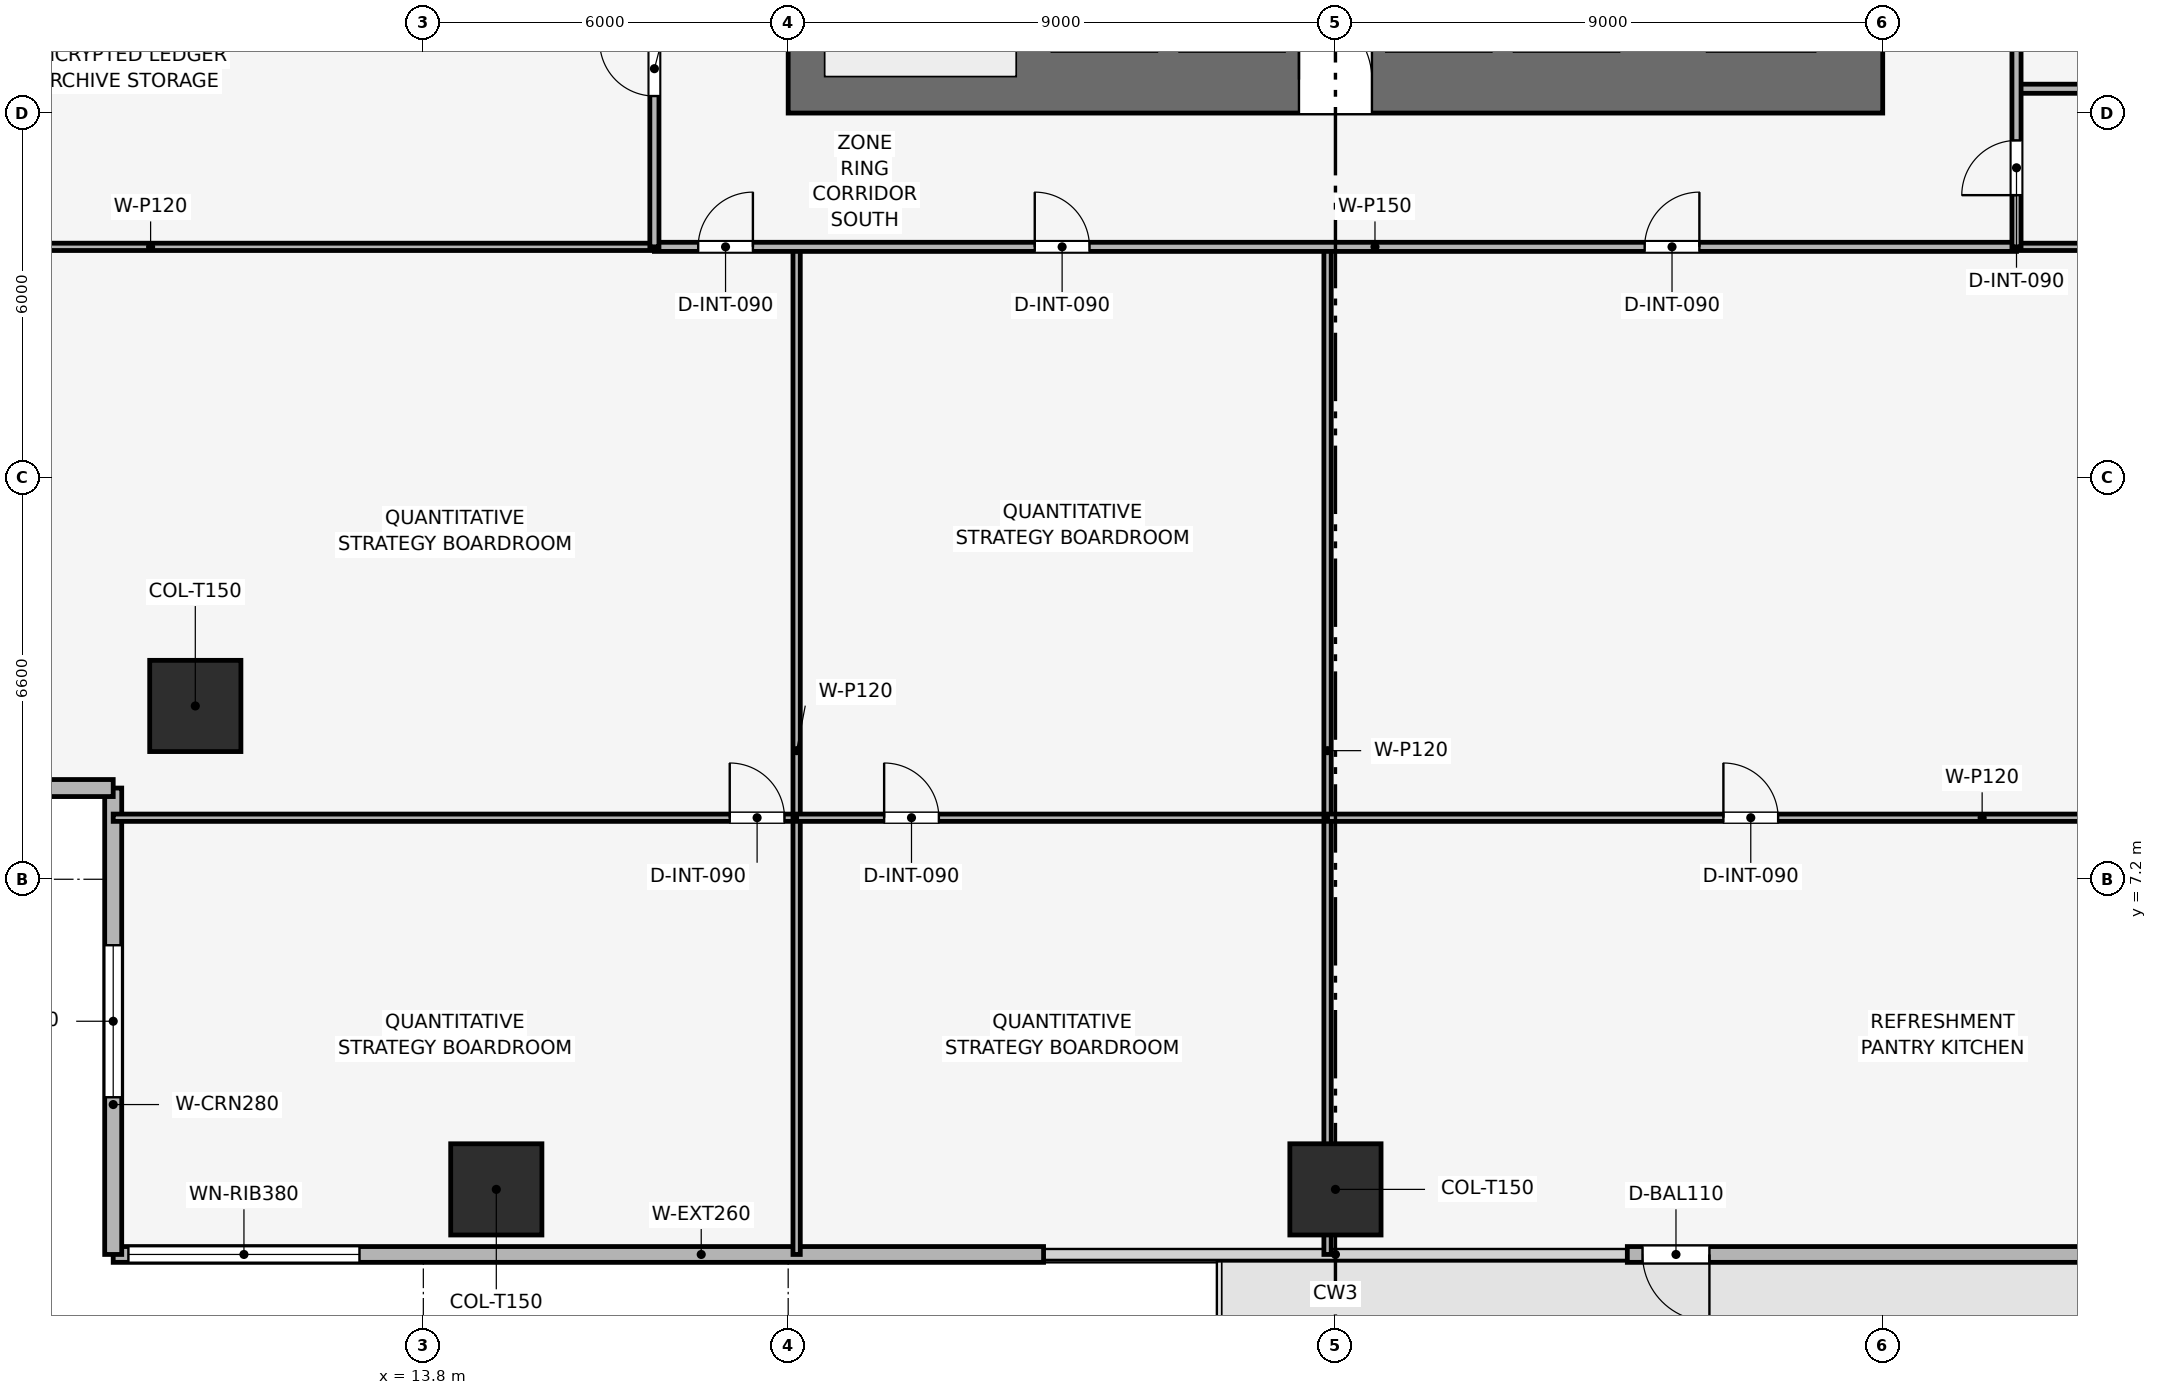
"""IFC4 building model, lengths in metres.
Left out: names, types, materials, properties, quantities, classifications, styles, units other than length and angle.
Written with IfcOpenShell. Run it as: python <this file> out.ifc"""

import sys

from ifc_helpers import new_model, si_unit, direction, frame, frame_2d, origin, origin_2d, place, context, subcontext, project, spatial, rectangle, extrude, element, fill, save


model = new_model("IFC4")
c1 = context("Model", 3, precision=1e-05, world=origin(), true_north=direction((0.0, 1.0)))
c2 = subcontext(c1, "Body", "Model", "MODEL_VIEW")
j1 = project(units=[si_unit("LENGTHUNIT", "METRE"), si_unit("PLANEANGLEUNIT", "RADIAN")], contexts=[c1])
p1 = place(None, origin())
s1 = spatial("IfcSite", under=j1, at=p1, CompositionType="ELEMENT")
p2 = place(p1, origin())
s2 = spatial("IfcBuilding", under=s1, at=p2, CompositionType="ELEMENT")
p3 = place(p2, frame((0.0, 0.0, 33.9)))
s3 = spatial("IfcBuildingStorey", under=s2, at=p3, CompositionType="ELEMENT", Elevation=33.9)
p4 = place(p3, frame((19.8, 20.35, 0.0), z_axis=(0.0, 0.0, 1.0), x_axis=(1.0, 0.0, 0.0)))
e1 = element("IfcWall", 1, at=p4, inside=s3, PredefinedType="SHEAR", context=c2, shape_type="SweptSolid", body=[
    extrude(rectangle(XDim=18.0, YDim=1.1, at=frame_2d((9.0, 0.0))), origin(), (0.0, 0.0, 1.0), 3.9),
])
p5 = place(p4, frame((8.4, 0.0, 0.0)))
e2 = element("IfcOpeningElement", 2, at=p5, cuts=e1, PredefinedType="OPENING", context=c2, shape_type="SweptSolid", body=[
    extrude(rectangle(XDim=1.2, YDim=2.2, at=frame_2d((0.6, 1.1))), frame((0.0, 0.56, 0.0), z_axis=(0.0, -1.0, 0.0), x_axis=(1.0, 0.0, 0.0)), (0.0, 0.0, 1.0), 1.12),
])
for number, where, z_axis, x_axis in (
    (3, (15.0, 2.1, 0.003), (0.0, 0.0, 1.0), (1.0, 0.0, 0.0)),
    (4, (28.8, 2.1, 0.003), (0.0, 0.0, 1.0), (1.0, 0.0, 0.0)),
    (5, (10.05, 10.05, 0.003), (0.0, 0.0, 1.0), (1.0, 0.0, 0.0)),
):
    element("IfcColumn", number, at=place(p3, frame(where, z_axis=z_axis, x_axis=x_axis)), inside=s3, PredefinedType="COLUMN", context=c2, shape_type="SweptSolid", body=[
        extrude(rectangle(XDim=1.5, YDim=1.5, at=origin_2d()), origin(), (0.0, 0.0, 1.0), 3.644),
    ])
p6 = place(p3, frame((48.9, 1.03, 0.0), z_axis=(0.0, 0.0, 1.0), x_axis=(-1.0, 0.0, 0.0)))
e6 = element("IfcWall", 6, at=p6, inside=s3, PredefinedType="SOLIDWALL", context=c2, shape_type="SweptSolid", body=[
    extrude(rectangle(XDim=15.3, YDim=0.26, at=frame_2d((7.65, 0.0))), origin(), (0.0, 0.0, 1.0), 3.65),
])
p7 = place(p6, frame((13.95, 0.0, 0.0)))
e7 = element("IfcOpeningElement", 7, at=p7, cuts=e6, PredefinedType="OPENING", context=c2, shape_type="SweptSolid", body=[
    extrude(rectangle(XDim=1.1, YDim=2.2, at=frame_2d((0.55, 1.1))), frame((0.0, 0.14, 0.0), z_axis=(0.0, -1.0, 0.0), x_axis=(1.0, 0.0, 0.0)), (0.0, 0.0, 1.0), 0.28),
])
p8 = place(p3, frame((24.0, 1.03, 0.0), z_axis=(0.0, 0.0, 1.0), x_axis=(-1.0, 0.0, 0.0)))
e8 = element("IfcWall", 8, at=p8, inside=s3, PredefinedType="SOLIDWALL", context=c2, shape_type="SweptSolid", body=[
    extrude(rectangle(XDim=15.3, YDim=0.26, at=frame_2d((7.65, 0.0))), origin(), (0.0, 0.0, 1.0), 3.65),
])
p9 = place(p8, frame((11.25, 0.0, 0.9)))
e9 = element("IfcOpeningElement", 9, at=p9, cuts=e8, PredefinedType="OPENING", context=c2, shape_type="SweptSolid", body=[
    extrude(rectangle(XDim=3.8, YDim=1.9, at=frame_2d((1.9, 0.95))), frame((0.0, 0.14, 0.0), z_axis=(0.0, -1.0, 0.0), x_axis=(1.0, 0.0, 0.0)), (0.0, 0.0, 1.0), 0.28),
])
p10 = place(p3, frame((8.7, 1.03, 0.0), z_axis=(0.0, 0.0, 1.0), x_axis=(0.0, 1.0, 0.0)))
e10 = element("IfcWall", 10, at=p10, inside=s3, PredefinedType="SOLIDWALL", context=c2, shape_type="SweptSolid", body=[
    extrude(rectangle(XDim=7.67, YDim=0.28, at=frame_2d((3.835, 0.0))), origin(), (0.0, 0.0, 1.0), 3.65),
])
p11 = place(p10, frame((2.585, 0.0, 0.9)))
e11 = element("IfcOpeningElement", 11, at=p11, cuts=e10, PredefinedType="OPENING", context=c2, shape_type="SweptSolid", body=[
    extrude(rectangle(XDim=2.5, YDim=1.9, at=frame_2d((1.25, 0.95))), frame((0.0, 0.15, 0.0), z_axis=(0.0, -1.0, 0.0), x_axis=(1.0, 0.0, 0.0)), (0.0, 0.0, 1.0), 0.3),
])
p12 = place(p3, frame((8.7, 8.7, 0.0), z_axis=(0.0, 0.0, 1.0), x_axis=(-1.0, 0.0, 0.0)))
e12 = element("IfcWall", 12, at=p12, inside=s3, PredefinedType="SOLIDWALL", context=c2, shape_type="SweptSolid", body=[
    extrude(rectangle(XDim=7.67, YDim=0.28, at=frame_2d((3.835, 0.0))), origin(), (0.0, 0.0, 1.0), 3.65),
])
p13 = place(p12, frame((2.585, 0.0, 0.9)))
e13 = element("IfcOpeningElement", 13, at=p13, cuts=e12, PredefinedType="OPENING", context=c2, shape_type="SweptSolid", body=[
    extrude(rectangle(XDim=2.5, YDim=1.9, at=frame_2d((1.25, 0.95))), frame((0.0, 0.15, 0.0), z_axis=(0.0, -1.0, 0.0), x_axis=(1.0, 0.0, 0.0)), (0.0, 0.0, 1.0), 0.3),
])
p14 = place(p3, frame((8.7, 8.212, 0.0), z_axis=(0.0, 0.0, 1.0), x_axis=(1.0, 0.0, 0.0)))
e14 = element("IfcWall", 14, at=p14, inside=s3, PredefinedType="PARTITIONING", context=c2, shape_type="SweptSolid", body=[
    extrude(rectangle(XDim=11.239, YDim=0.12, at=frame_2d((5.62, 0.0))), origin(), (0.0, 0.0, 1.0), 2.935),
])
p15 = place(p14, frame((10.139, 0.0, 0.0)))
e15 = element("IfcOpeningElement", 15, at=p15, cuts=e14, PredefinedType="OPENING", context=c2, shape_type="SweptSolid", body=[
    extrude(rectangle(XDim=0.9, YDim=2.1, at=frame_2d((0.45, 1.05))), frame((0.0, 0.07, 0.0), z_axis=(0.0, -1.0, 0.0), x_axis=(1.0, 0.0, 0.0)), (0.0, 0.0, 1.0), 0.14),
])
p16 = place(p3, frame((19.939, 1.03, 0.0), z_axis=(0.0, 0.0, 1.0), x_axis=(0.0, 1.0, 0.0)))
e16 = element("IfcWall", 16, at=p16, inside=s3, PredefinedType="PARTITIONING", context=c2, shape_type="SweptSolid", body=[
    extrude(rectangle(XDim=16.57, YDim=0.12, at=frame_2d((8.285, 0.0))), origin(), (0.0, 0.0, 1.0), 2.935),
])
p17 = place(p3, frame((19.939, 8.212, 0.0), z_axis=(0.0, 0.0, 1.0), x_axis=(1.0, 0.0, 0.0)))
e17 = element("IfcWall", 17, at=p17, inside=s3, PredefinedType="PARTITIONING", context=c2, shape_type="SweptSolid", body=[
    extrude(rectangle(XDim=8.731, YDim=0.12, at=frame_2d((4.365, 0.0))), origin(), (0.0, 0.0, 1.0), 3.085),
])
p18 = place(p17, frame((1.439, 0.0, 0.0)))
e18 = element("IfcOpeningElement", 18, at=p18, cuts=e17, PredefinedType="OPENING", context=c2, shape_type="SweptSolid", body=[
    extrude(rectangle(XDim=0.9, YDim=2.1, at=frame_2d((0.45, 1.05))), frame((0.0, 0.07, 0.0), z_axis=(0.0, -1.0, 0.0), x_axis=(1.0, 0.0, 0.0)), (0.0, 0.0, 1.0), 0.14),
])
p19 = place(p3, frame((28.67, 1.03, 0.0), z_axis=(0.0, 0.0, 1.0), x_axis=(0.0, 1.0, 0.0)))
e19 = element("IfcWall", 19, at=p19, inside=s3, PredefinedType="PARTITIONING", context=c2, shape_type="SweptSolid", body=[
    extrude(rectangle(XDim=16.57, YDim=0.12, at=frame_2d((8.285, 0.0))), origin(), (0.0, 0.0, 1.0), 3.085),
])
p20 = place(p3, frame((28.67, 8.212, 0.0), z_axis=(0.0, 0.0, 1.0), x_axis=(1.0, 0.0, 0.0)))
e20 = element("IfcWall", 20, at=p20, inside=s3, PredefinedType="PARTITIONING", context=c2, shape_type="SweptSolid", body=[
    extrude(rectangle(XDim=20.23, YDim=0.12, at=frame_2d((10.115, 0.0))), origin(), (0.0, 0.0, 1.0), 2.935),
])
p21 = place(p20, frame((6.51, 0.0, 0.0)))
e21 = element("IfcOpeningElement", 21, at=p21, cuts=e20, PredefinedType="OPENING", context=c2, shape_type="SweptSolid", body=[
    extrude(rectangle(XDim=0.9, YDim=2.1, at=frame_2d((0.45, 1.05))), frame((0.0, 0.07, 0.0), z_axis=(0.0, -1.0, 0.0), x_axis=(1.0, 0.0, 0.0)), (0.0, 0.0, 1.0), 0.14),
])
for number, where, z_axis, x_axis in (
    (22, (1.03, 17.6, 0.0), (0.0, 0.0, 1.0), (1.0, 0.0, 0.0)),
    (23, (40.0, 17.6, 0.0), (0.0, 0.0, 1.0), (1.0, 0.0, 0.0)),
):
    element("IfcWall", number, at=place(p3, frame(where, z_axis=z_axis, x_axis=x_axis)), inside=s3, PredefinedType="PARTITIONING", context=c2, shape_type="SweptSolid", body=[
        extrude(rectangle(XDim=16.57, YDim=0.12, at=frame_2d((8.285, 0.0))), origin(), (0.0, 0.0, 1.0), 2.935),
    ])
p22 = place(p3, frame((40.0, 20.2, 0.0), z_axis=(0.0, 0.0, 1.0), x_axis=(1.0, 0.0, 0.0)))
e24 = element("IfcWall", 24, at=p22, inside=s3, PredefinedType="PARTITIONING", context=c2, shape_type="SweptSolid", body=[
    extrude(rectangle(XDim=16.57, YDim=0.15, at=frame_2d((8.285, 0.0))), origin(), (0.0, 0.0, 1.0), 2.935),
])
p23 = place(p22, frame((9.435, 0.0, 0.0)))
e25 = element("IfcOpeningElement", 25, at=p23, cuts=e24, PredefinedType="OPENING", context=c2, shape_type="SweptSolid", body=[
    extrude(rectangle(XDim=0.9, YDim=2.1, at=frame_2d((0.45, 1.05))), frame((0.0, 0.085, 0.0), z_axis=(0.0, -1.0, 0.0), x_axis=(1.0, 0.0, 0.0)), (0.0, 0.0, 1.0), 0.17),
])
p24 = place(p3, frame((17.6, 17.6, 0.0), z_axis=(0.0, 0.0, 1.0), x_axis=(1.0, 0.0, 0.0)))
e26 = element("IfcWall", 26, at=p24, inside=s3, PredefinedType="PARTITIONING", context=c2, shape_type="SweptSolid", body=[
    extrude(rectangle(XDim=22.4, YDim=0.15, at=frame_2d((11.2, 0.0))), origin(), (0.0, 0.0, 1.0), 3.085),
])
p25 = place(p24, frame((0.72, 0.0, 0.0)))
e27 = element("IfcOpeningElement", 27, at=p25, cuts=e26, PredefinedType="OPENING", context=c2, shape_type="SweptSolid", body=[
    extrude(rectangle(XDim=0.9, YDim=2.1, at=frame_2d((0.45, 1.05))), frame((0.0, 0.085, 0.0), z_axis=(0.0, -1.0, 0.0), x_axis=(1.0, 0.0, 0.0)), (0.0, 0.0, 1.0), 0.17),
])
p26 = place(p24, frame((6.255, 0.0, 0.0)))
e28 = element("IfcOpeningElement", 28, at=p26, cuts=e26, PredefinedType="OPENING", context=c2, shape_type="SweptSolid", body=[
    extrude(rectangle(XDim=0.9, YDim=2.1, at=frame_2d((0.45, 1.05))), frame((0.0, 0.085, 0.0), z_axis=(0.0, -1.0, 0.0), x_axis=(1.0, 0.0, 0.0)), (0.0, 0.0, 1.0), 0.17),
])
p27 = place(p24, frame((16.285, 0.0, 0.0)))
e29 = element("IfcOpeningElement", 29, at=p27, cuts=e26, PredefinedType="OPENING", context=c2, shape_type="SweptSolid", body=[
    extrude(rectangle(XDim=0.9, YDim=2.1, at=frame_2d((0.45, 1.05))), frame((0.0, 0.085, 0.0), z_axis=(0.0, -1.0, 0.0), x_axis=(1.0, 0.0, 0.0)), (0.0, 0.0, 1.0), 0.17),
])
p28 = place(p3, frame((17.6, 17.6, 0.0), z_axis=(0.0, 0.0, 1.0), x_axis=(0.0, 1.0, 0.0)))
e30 = element("IfcWall", 30, at=p28, inside=s3, PredefinedType="PARTITIONING", context=c2, shape_type="SweptSolid", body=[
    extrude(rectangle(XDim=22.4, YDim=0.15, at=frame_2d((11.2, 0.0))), origin(), (0.0, 0.0, 1.0), 3.085),
])
p29 = place(p28, frame((2.48, 0.0, 0.0)))
e31 = element("IfcOpeningElement", 31, at=p29, cuts=e30, PredefinedType="OPENING", context=c2, shape_type="SweptSolid", body=[
    extrude(rectangle(XDim=0.9, YDim=2.1, at=frame_2d((0.45, 1.05))), frame((0.0, 0.085, 0.0), z_axis=(0.0, -1.0, 0.0), x_axis=(1.0, 0.0, 0.0)), (0.0, 0.0, 1.0), 0.17),
])
p30 = place(p28, frame((13.68, 0.0, 0.0)))
e32 = element("IfcOpeningElement", 32, at=p30, cuts=e30, PredefinedType="OPENING", context=c2, shape_type="SweptSolid", body=[
    extrude(rectangle(XDim=0.9, YDim=2.1, at=frame_2d((0.45, 1.05))), frame((0.0, 0.085, 0.0), z_axis=(0.0, -1.0, 0.0), x_axis=(1.0, 0.0, 0.0)), (0.0, 0.0, 1.0), 0.17),
])
p31 = place(p3, frame((40.0, 17.6, 0.0), z_axis=(0.0, 0.0, 1.0), x_axis=(0.0, 1.0, 0.0)))
e33 = element("IfcWall", 33, at=p31, inside=s3, PredefinedType="PARTITIONING", context=c2, shape_type="SweptSolid", body=[
    extrude(rectangle(XDim=22.4, YDim=0.15, at=frame_2d((11.2, 0.0))), origin(), (0.0, 0.0, 1.0), 3.085),
])
p32 = place(p31, frame((0.85, 0.0, 0.0)))
e34 = element("IfcOpeningElement", 34, at=p32, cuts=e33, PredefinedType="OPENING", context=c2, shape_type="SweptSolid", body=[
    extrude(rectangle(XDim=0.9, YDim=2.1, at=frame_2d((0.45, 1.05))), frame((0.0, 0.085, 0.0), z_axis=(0.0, -1.0, 0.0), x_axis=(1.0, 0.0, 0.0)), (0.0, 0.0, 1.0), 0.17),
])
p33 = place(p31, frame((3.55, 0.0, 0.0)))
e35 = element("IfcOpeningElement", 35, at=p33, cuts=e33, PredefinedType="OPENING", context=c2, shape_type="SweptSolid", body=[
    extrude(rectangle(XDim=0.9, YDim=2.1, at=frame_2d((0.45, 1.05))), frame((0.0, 0.085, 0.0), z_axis=(0.0, -1.0, 0.0), x_axis=(1.0, 0.0, 0.0)), (0.0, 0.0, 1.0), 0.17),
])
p34 = place(p31, frame((6.45, 0.0, 0.0)))
e36 = element("IfcOpeningElement", 36, at=p34, cuts=e33, PredefinedType="OPENING", context=c2, shape_type="SweptSolid", body=[
    extrude(rectangle(XDim=0.9, YDim=2.1, at=frame_2d((0.45, 1.05))), frame((0.0, 0.085, 0.0), z_axis=(0.0, -1.0, 0.0), x_axis=(1.0, 0.0, 0.0)), (0.0, 0.0, 1.0), 0.17),
])
p35 = place(p31, frame((9.2, 0.0, 0.0)))
e37 = element("IfcOpeningElement", 37, at=p35, cuts=e33, PredefinedType="OPENING", context=c2, shape_type="SweptSolid", body=[
    extrude(rectangle(XDim=0.95, YDim=2.1, at=frame_2d((0.475, 1.05))), frame((0.0, 0.085, 0.0), z_axis=(0.0, -1.0, 0.0), x_axis=(1.0, 0.0, 0.0)), (0.0, 0.0, 1.0), 0.17),
])
p36 = place(p31, frame((16.25, 0.0, 0.0)))
e38 = element("IfcOpeningElement", 38, at=p36, cuts=e33, PredefinedType="OPENING", context=c2, shape_type="SweptSolid", body=[
    extrude(rectangle(XDim=0.9, YDim=2.1, at=frame_2d((0.45, 1.05))), frame((0.0, 0.085, 0.0), z_axis=(0.0, -1.0, 0.0), x_axis=(1.0, 0.0, 0.0)), (0.0, 0.0, 1.0), 0.17),
])
p37 = place(p7, origin())
e39 = element("IfcDoor", 39, at=p37, inside=s3, OperationType="SINGLE_SWING_LEFT", PredefinedType="DOOR", context=c2, shape_type="SweptSolid", body=[
    extrude(rectangle(XDim=1.1, YDim=2.2, at=frame_2d((0.55, 1.1))), frame((0.0, 0.025, 0.0), z_axis=(0.0, -1.0, 0.0), x_axis=(1.0, 0.0, 0.0)), (0.0, 0.0, 1.0), 0.05),
])
fill(e7, e39)
p38 = place(p9, origin())
e40 = element("IfcWindow", 40, at=p38, inside=s3, PartitioningType="SINGLE_PANEL", PredefinedType="WINDOW", context=c2, shape_type="SweptSolid", body=[
    extrude(rectangle(XDim=3.8, YDim=1.9, at=frame_2d((1.9, 0.95))), frame((0.0, 0.03, 0.0), z_axis=(0.0, -1.0, 0.0), x_axis=(1.0, 0.0, 0.0)), (0.0, 0.0, 1.0), 0.06),
])
fill(e9, e40)
p39 = place(p11, origin())
e41 = element("IfcWindow", 41, at=p39, inside=s3, PartitioningType="SINGLE_PANEL", PredefinedType="WINDOW", context=c2, shape_type="SweptSolid", body=[
    extrude(rectangle(XDim=2.5, YDim=1.9, at=frame_2d((1.25, 0.95))), frame((0.0, 0.03, 0.0), z_axis=(0.0, -1.0, 0.0), x_axis=(1.0, 0.0, 0.0)), (0.0, 0.0, 1.0), 0.06),
])
fill(e11, e41)
p40 = place(p15, origin())
e42 = element("IfcDoor", 42, at=p40, inside=s3, OperationType="SINGLE_SWING_LEFT", PredefinedType="DOOR", context=c2, shape_type="SweptSolid", body=[
    extrude(rectangle(XDim=0.9, YDim=2.1, at=frame_2d((0.45, 1.05))), frame((0.0, 0.025, 0.0), z_axis=(0.0, -1.0, 0.0), x_axis=(1.0, 0.0, 0.0)), (0.0, 0.0, 1.0), 0.05),
])
fill(e15, e42)
p41 = place(p18, origin())
e43 = element("IfcDoor", 43, at=p41, inside=s3, OperationType="SINGLE_SWING_LEFT", PredefinedType="DOOR", context=c2, shape_type="SweptSolid", body=[
    extrude(rectangle(XDim=0.9, YDim=2.1, at=frame_2d((0.45, 1.05))), frame((0.0, 0.025, 0.0), z_axis=(0.0, -1.0, 0.0), x_axis=(1.0, 0.0, 0.0)), (0.0, 0.0, 1.0), 0.05),
])
fill(e18, e43)
p42 = place(p21, origin())
e44 = element("IfcDoor", 44, at=p42, inside=s3, OperationType="SINGLE_SWING_LEFT", PredefinedType="DOOR", context=c2, shape_type="SweptSolid", body=[
    extrude(rectangle(XDim=0.9, YDim=2.1, at=frame_2d((0.45, 1.05))), frame((0.0, 0.025, 0.0), z_axis=(0.0, -1.0, 0.0), x_axis=(1.0, 0.0, 0.0)), (0.0, 0.0, 1.0), 0.05),
])
fill(e21, e44)
p43 = place(p25, origin())
e45 = element("IfcDoor", 45, at=p43, inside=s3, OperationType="SINGLE_SWING_RIGHT", PredefinedType="DOOR", context=c2, shape_type="SweptSolid", body=[
    extrude(rectangle(XDim=0.9, YDim=2.1, at=frame_2d((0.45, 1.05))), frame((0.0, 0.025, 0.0), z_axis=(0.0, -1.0, 0.0), x_axis=(1.0, 0.0, 0.0)), (0.0, 0.0, 1.0), 0.05),
])
fill(e27, e45)
p44 = place(p26, origin())
e46 = element("IfcDoor", 46, at=p44, inside=s3, OperationType="SINGLE_SWING_LEFT", PredefinedType="DOOR", context=c2, shape_type="SweptSolid", body=[
    extrude(rectangle(XDim=0.9, YDim=2.1, at=frame_2d((0.45, 1.05))), frame((0.0, 0.025, 0.0), z_axis=(0.0, -1.0, 0.0), x_axis=(1.0, 0.0, 0.0)), (0.0, 0.0, 1.0), 0.05),
])
fill(e28, e46)
p45 = place(p27, origin())
e47 = element("IfcDoor", 47, at=p45, inside=s3, OperationType="SINGLE_SWING_RIGHT", PredefinedType="DOOR", context=c2, shape_type="SweptSolid", body=[
    extrude(rectangle(XDim=0.9, YDim=2.1, at=frame_2d((0.45, 1.05))), frame((0.0, 0.025, 0.0), z_axis=(0.0, -1.0, 0.0), x_axis=(1.0, 0.0, 0.0)), (0.0, 0.0, 1.0), 0.05),
])
fill(e29, e47)
p46 = place(p29, origin())
e48 = element("IfcDoor", 48, at=p46, inside=s3, OperationType="SINGLE_SWING_RIGHT", PredefinedType="DOOR", context=c2, shape_type="SweptSolid", body=[
    extrude(rectangle(XDim=0.9, YDim=2.1, at=frame_2d((0.45, 1.05))), frame((0.0, 0.025, 0.0), z_axis=(0.0, -1.0, 0.0), x_axis=(1.0, 0.0, 0.0)), (0.0, 0.0, 1.0), 0.05),
])
fill(e31, e48)
p47 = place(p32, origin())
e49 = element("IfcDoor", 49, at=p47, inside=s3, OperationType="SINGLE_SWING_LEFT", PredefinedType="DOOR", context=c2, shape_type="SweptSolid", body=[
    extrude(rectangle(XDim=0.9, YDim=2.1, at=frame_2d((0.45, 1.05))), frame((0.0, 0.025, 0.0), z_axis=(0.0, -1.0, 0.0), x_axis=(1.0, 0.0, 0.0)), (0.0, 0.0, 1.0), 0.05),
])
fill(e34, e49)
p48 = place(p5, origin())
e50 = element("IfcDoor", 50, at=p48, inside=s3, OperationType="SINGLE_SWING_LEFT", PredefinedType="DOOR", context=c2, shape_type="SweptSolid", body=[
    extrude(rectangle(XDim=1.2, YDim=2.2, at=frame_2d((0.6, 1.1))), frame((0.0, 0.025, 0.0), z_axis=(0.0, -1.0, 0.0), x_axis=(1.0, 0.0, 0.0)), (0.0, 0.0, 1.0), 0.05),
])
fill(e2, e50)
save(model, sys.argv[1])
